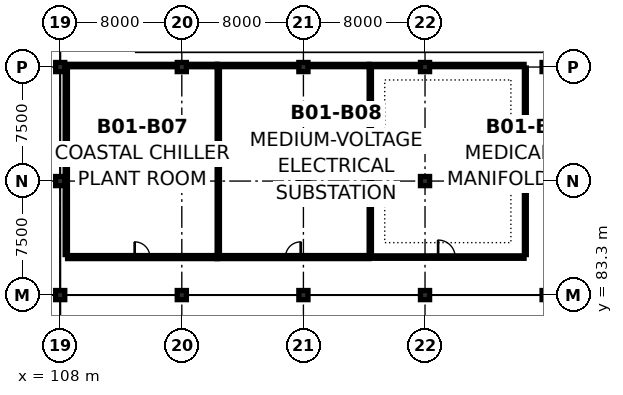
"""IFC4 building model, lengths in metres.
Left out: names, types, materials, properties, quantities, classifications, styles, units other than length and angle.
Written with IfcOpenShell. Run it as: python <this file> out.ifc"""

import sys

from ifc_helpers import new_model, si_unit, direction, frame, frame_2d, origin, origin_2d, place, context, subcontext, project, spatial, rectangle, extrude, element, fill, save


model = new_model("IFC4")
c1 = context("Model", 3, precision=1e-05, world=origin(), true_north=direction((0.0, 1.0)))
c2 = subcontext(c1, "Body", "Model", "MODEL_VIEW")
j1 = project(units=[si_unit("LENGTHUNIT", "METRE"), si_unit("PLANEANGLEUNIT", "RADIAN")], contexts=[c1])
p1 = place(None, origin())
s1 = spatial("IfcSite", under=j1, at=p1, CompositionType="ELEMENT")
p2 = place(p1, origin())
s2 = spatial("IfcBuilding", under=s1, at=p2, CompositionType="ELEMENT")
p3 = place(p2, frame((0.0, 0.0, -4.2)))
s3 = spatial("IfcBuildingStorey", under=s2, at=p3, CompositionType="ELEMENT", Elevation=-4.2)
for number, where, z_axis, x_axis in (
    (1, (108.0, 83.3, 0.0), (0.0, 0.0, 1.0), (1.0, 0.0, 0.0)),
    (2, (108.0, 90.8, 0.0), (0.0, 0.0, 1.0), (1.0, 0.0, 0.0)),
    (3, (108.0, 98.3, 0.0), (0.0, 0.0, 1.0), (1.0, 0.0, 0.0)),
):
    element("IfcColumn", number, at=place(p3, frame(where, z_axis=z_axis, x_axis=x_axis)), inside=s3, PredefinedType="COLUMN", context=c2, shape_type="SweptSolid", body=[
        extrude(rectangle(XDim=0.6, YDim=0.6, at=origin_2d()), origin(), (0.0, 0.0, 1.0), 3.78),
    ])
for number, where, z_axis, x_axis in (
    (4, (116.0, 83.3, 0.0), (0.0, 0.0, 1.0), (1.0, 0.0, 0.0)),
    (5, (116.0, 90.8, 0.0), (0.0, 0.0, 1.0), (1.0, 0.0, 0.0)),
    (6, (116.0, 98.3, 0.0), (0.0, 0.0, 1.0), (1.0, 0.0, 0.0)),
    (7, (124.0, 83.3, 0.0), (0.0, 0.0, 1.0), (1.0, 0.0, 0.0)),
    (8, (124.0, 90.8, 0.0), (0.0, 0.0, 1.0), (1.0, 0.0, 0.0)),
    (9, (124.0, 98.3, 0.0), (0.0, 0.0, 1.0), (1.0, 0.0, 0.0)),
    (10, (132.0, 83.3, 0.0), (0.0, 0.0, 1.0), (1.0, 0.0, 0.0)),
    (11, (132.0, 90.8, 0.0), (0.0, 0.0, 1.0), (1.0, 0.0, 0.0)),
    (12, (132.0, 98.3, 0.0), (0.0, 0.0, 1.0), (1.0, 0.0, 0.0)),
    (13, (140.0, 83.3, 0.0), (0.0, 0.0, 1.0), (1.0, 0.0, 0.0)),
    (14, (140.0, 90.8, 0.0), (0.0, 0.0, 1.0), (1.0, 0.0, 0.0)),
    (15, (140.0, 98.3, 0.0), (0.0, 0.0, 1.0), (1.0, 0.0, 0.0)),
):
    element("IfcColumn", number, at=place(p3, frame(where, z_axis=z_axis, x_axis=x_axis)), inside=s3, PredefinedType="COLUMN", context=c2, shape_type="SweptSolid", body=[
        extrude(rectangle(XDim=0.6, YDim=0.6, at=origin_2d()), origin(), (0.0, 0.0, 1.0), 3.75),
    ])
p4 = place(p3, frame((108.485, 85.8, 0.0), z_axis=(0.0, 0.0, 1.0), x_axis=(1.0, 0.0, 0.0)))
e16 = element("IfcWall", 16, at=p4, inside=s3, PredefinedType="PARTITIONING", context=c2, shape_type="SweptSolid", body=[
    extrude(rectangle(XDim=9.83, YDim=0.2, at=frame_2d((4.915, 0.0))), origin(), (0.0, 0.0, 1.0), 3.035),
])
p5 = place(p4, frame((4.415, 0.0, 0.0)))
e17 = element("IfcOpeningElement", 17, at=p5, cuts=e16, PredefinedType="OPENING", context=c2, shape_type="SweptSolid", body=[
    extrude(rectangle(XDim=1.0, YDim=2.15, at=frame_2d((0.5, 1.075))), frame((0.0, 0.112, 0.0), z_axis=(0.0, -1.0, 0.0), x_axis=(1.0, 0.0, 0.0)), (0.0, 0.0, 1.0), 0.224),
])
p6 = place(p3, frame((118.327, 85.8, 0.0), z_axis=(0.0, 0.0, 1.0), x_axis=(1.0, 0.0, 0.0)))
e18 = element("IfcWall", 18, at=p6, inside=s3, PredefinedType="PARTITIONING", context=c2, shape_type="SweptSolid", body=[
    extrude(rectangle(XDim=9.988, YDim=0.2, at=frame_2d((4.994, 0.0))), origin(), (0.0, 0.0, 1.0), 3.035),
])
p7 = place(p6, frame((4.494, 0.0, 0.0)))
e19 = element("IfcOpeningElement", 19, at=p7, cuts=e18, PredefinedType="OPENING", context=c2, shape_type="SweptSolid", body=[
    extrude(rectangle(XDim=1.0, YDim=2.15, at=frame_2d((0.5, 1.075))), frame((0.0, 0.112, 0.0), z_axis=(0.0, -1.0, 0.0), x_axis=(1.0, 0.0, 0.0)), (0.0, 0.0, 1.0), 0.224),
])
p8 = place(p3, frame((128.327, 85.8, 0.0), z_axis=(0.0, 0.0, 1.0), x_axis=(1.0, 0.0, 0.0)))
e20 = element("IfcWall", 20, at=p8, inside=s3, PredefinedType="PARTITIONING", context=c2, shape_type="SweptSolid", body=[
    extrude(rectangle(XDim=10.188, YDim=0.16, at=frame_2d((5.094, 0.0))), origin(), (0.0, 0.0, 1.0), 3.035),
])
p9 = place(p8, frame((4.534, 0.0, 0.0)))
e21 = element("IfcOpeningElement", 21, at=p9, cuts=e20, PredefinedType="OPENING", context=c2, shape_type="SweptSolid", body=[
    extrude(rectangle(XDim=1.12, YDim=2.2, at=frame_2d((0.56, 1.1))), frame((0.0, 0.092, 0.0), z_axis=(0.0, -1.0, 0.0), x_axis=(1.0, 0.0, 0.0)), (0.0, 0.0, 1.0), 0.184),
])
p10 = place(p3, frame((108.312, 98.4, 0.0), z_axis=(0.0, 0.0, 1.0), x_axis=(1.0, 0.0, 0.0)))
e22 = element("IfcWall", 22, at=p10, inside=s3, PredefinedType="PARTITIONING", context=c2, shape_type="SweptSolid", body=[
    extrude(rectangle(XDim=10.003, YDim=0.16, at=frame_2d((5.001, 0.0))), origin(), (0.0, 0.0, 1.0), 2.935),
])
p11 = place(p3, frame((118.327, 98.4, 0.0), z_axis=(0.0, 0.0, 1.0), x_axis=(1.0, 0.0, 0.0)))
e23 = element("IfcWall", 23, at=p11, inside=s3, PredefinedType="PARTITIONING", context=c2, shape_type="SweptSolid", body=[
    extrude(rectangle(XDim=9.988, YDim=0.15, at=frame_2d((4.994, 0.0))), origin(), (0.0, 0.0, 1.0), 2.935),
])
p12 = place(p3, frame((128.327, 98.4, 0.0), z_axis=(0.0, 0.0, 1.0), x_axis=(1.0, 0.0, 0.0)))
e24 = element("IfcWall", 24, at=p12, inside=s3, PredefinedType="PARTITIONING", context=c2, shape_type="SweptSolid", body=[
    extrude(rectangle(XDim=10.188, YDim=0.15, at=frame_2d((5.094, 0.0))), origin(), (0.0, 0.0, 1.0), 2.935),
])
p13 = place(p3, frame((108.4, 85.965, 0.0), z_axis=(0.0, 0.0, 1.0), x_axis=(0.0, 1.0, 0.0)))
e25 = element("IfcWall", 25, at=p13, inside=s3, PredefinedType="PARTITIONING", context=c2, shape_type="SweptSolid", body=[
    extrude(rectangle(XDim=12.343, YDim=0.15, at=frame_2d((6.171, 0.0))), origin(), (0.0, 0.0, 1.0), 2.935),
])
for number, where, z_axis, x_axis in (
    (26, (118.4, 85.892, 0.0), (0.0, 0.0, 1.0), (0.0, 1.0, 0.0)),
    (27, (128.4, 85.892, 0.0), (0.0, 0.0, 1.0), (0.0, 1.0, 0.0)),
):
    element("IfcWall", number, at=place(p3, frame(where, z_axis=z_axis, x_axis=x_axis)), inside=s3, PredefinedType="PARTITIONING", context=c2, shape_type="SweptSolid", body=[
        extrude(rectangle(XDim=12.421, YDim=0.15, at=frame_2d((6.21, 0.0))), origin(), (0.0, 0.0, 1.0), 2.935),
    ])
p14 = place(p3, frame((138.6, 85.965, 0.0), z_axis=(0.0, 0.0, 1.0), x_axis=(0.0, 1.0, 0.0)))
e28 = element("IfcWall", 28, at=p14, inside=s3, PredefinedType="PARTITIONING", context=c2, shape_type="SweptSolid", body=[
    extrude(rectangle(XDim=12.27, YDim=0.125, at=frame_2d((6.135, 0.0))), origin(), (0.0, 0.0, 1.0), 2.935),
])
p15 = place(p5, origin())
e29 = element("IfcDoor", 29, at=p15, inside=s3, OperationType="SINGLE_SWING_LEFT", PredefinedType="DOOR", context=c2, shape_type="SweptSolid", body=[
    extrude(rectangle(XDim=1.0, YDim=2.15, at=frame_2d((0.5, 1.075))), frame((0.0, 0.025, 0.0), z_axis=(0.0, -1.0, 0.0), x_axis=(1.0, 0.0, 0.0)), (0.0, 0.0, 1.0), 0.05),
])
fill(e17, e29)
p16 = place(p7, origin())
e30 = element("IfcDoor", 30, at=p16, inside=s3, OperationType="SINGLE_SWING_RIGHT", PredefinedType="DOOR", context=c2, shape_type="SweptSolid", body=[
    extrude(rectangle(XDim=1.0, YDim=2.15, at=frame_2d((0.5, 1.075))), frame((0.0, 0.025, 0.0), z_axis=(0.0, -1.0, 0.0), x_axis=(1.0, 0.0, 0.0)), (0.0, 0.0, 1.0), 0.05),
])
fill(e19, e30)
p17 = place(p9, origin())
e31 = element("IfcDoor", 31, at=p17, inside=s3, OperationType="SINGLE_SWING_LEFT", PredefinedType="DOOR", context=c2, shape_type="SweptSolid", body=[
    extrude(rectangle(XDim=1.12, YDim=2.2, at=frame_2d((0.56, 1.1))), frame((0.0, 0.025, 0.0), z_axis=(0.0, -1.0, 0.0), x_axis=(1.0, 0.0, 0.0)), (0.0, 0.0, 1.0), 0.05),
])
fill(e21, e31)
save(model, sys.argv[1])
